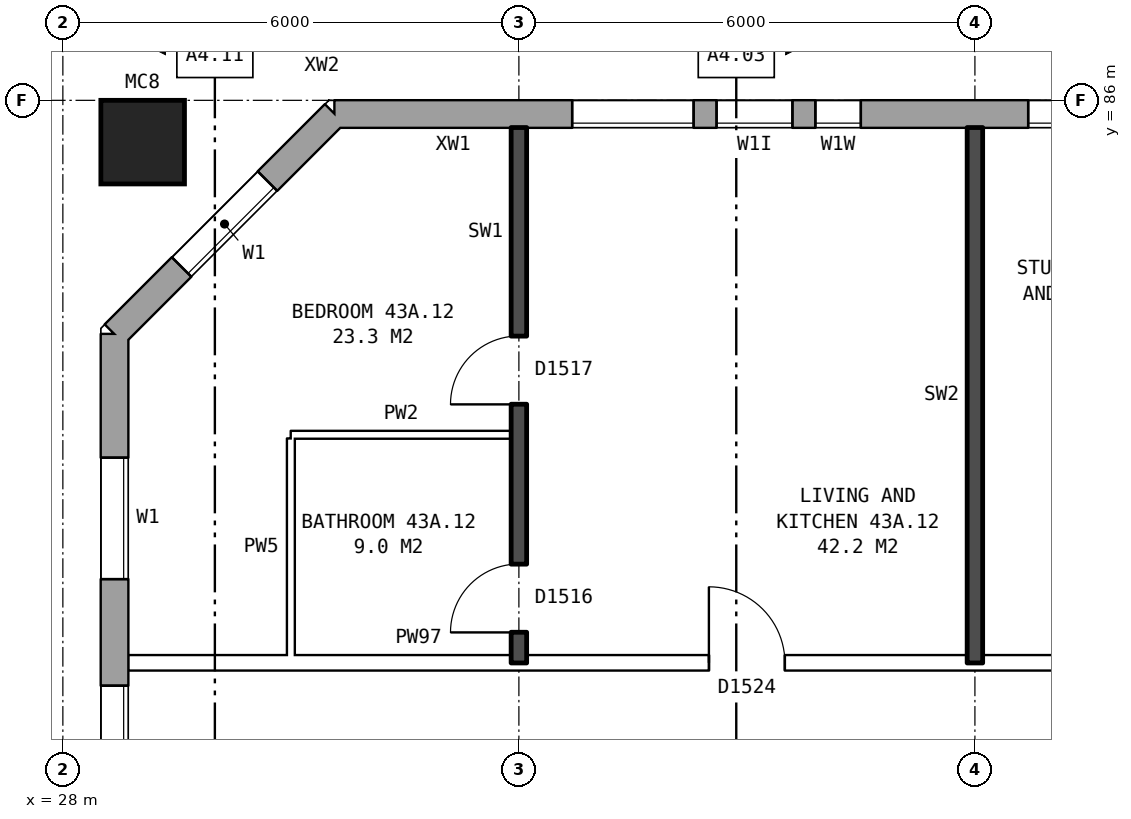
"""IFC4 building model, lengths in metres.
Left out: names, types, materials, properties, quantities, classifications, styles, units other than length and angle.
Written with IfcOpenShell. Run it as: python <this file> out.ifc"""

import sys

from ifc_helpers import new_model, si_unit, direction, frame, frame_2d, origin, origin_2d, place, context, subcontext, project, spatial, rectangle, hollow_rectangle, extrude, element, fill, save


model = new_model("IFC4")
c1 = context("Model", 3, precision=1e-05, world=origin(), true_north=direction((0.0, 1.0)))
c2 = subcontext(c1, "Body", "Model", "MODEL_VIEW")
j1 = project(units=[si_unit("LENGTHUNIT", "METRE"), si_unit("PLANEANGLEUNIT", "RADIAN")], contexts=[c1])
p1 = place(None, origin())
s1 = spatial("IfcSite", under=j1, at=p1, CompositionType="ELEMENT")
p2 = place(p1, origin())
s2 = spatial("IfcBuilding", under=s1, at=p2, CompositionType="ELEMENT")
p3 = place(p2, frame((0.0, 0.0, 154.7)))
s3 = spatial("IfcBuildingStorey", under=s2, at=p3, CompositionType="ELEMENT", Elevation=154.7)
p4 = place(p3, frame((29.05, 85.45, 0.0), z_axis=(0.0, 0.0, 1.0), x_axis=(1.0, 0.0, 0.0)))
e1 = element("IfcColumn", 1, at=p4, inside=s3, PredefinedType="COLUMN", context=c2, shape_type="SweptSolid", body=[
    extrude(hollow_rectangle(XDim=1.1, YDim=1.1, WallThickness=0.06, at=origin_2d()), origin(), (0.0, 0.0, 1.0), 3.1),
])
p5 = place(p3, frame((72.925, 85.82, 0.0), z_axis=(0.0, 0.0, 1.0), x_axis=(-1.0, 0.0, 0.0)))
e2 = element("IfcWall", 2, at=p5, inside=s3, PredefinedType="STANDARD", context=c2, shape_type="SweptSolid", body=[
    extrude(rectangle(XDim=41.351, YDim=0.36, at=frame_2d((20.675, 0.0))), origin(), (0.0, 0.0, 1.0), 2.85),
])
p6 = place(p5, frame((0.625, 0.0, 0.8)))
e3 = element("IfcOpeningElement", 3, at=p6, cuts=e2, PredefinedType="OPENING", context=c2, shape_type="SweptSolid", body=[
    extrude(rectangle(XDim=1.6, YDim=1.8, at=frame_2d((0.8, 0.9))), frame((0.0, 0.19, 0.0), z_axis=(0.0, -1.0, 0.0), x_axis=(1.0, 0.0, 0.0)), (0.0, 0.0, 1.0), 0.38),
])
p7 = place(p5, frame((3.625, 0.0, 0.8)))
e4 = element("IfcOpeningElement", 4, at=p7, cuts=e2, PredefinedType="OPENING", context=c2, shape_type="SweptSolid", body=[
    extrude(rectangle(XDim=1.6, YDim=1.8, at=frame_2d((0.8, 0.9))), frame((0.0, 0.19, 0.0), z_axis=(0.0, -1.0, 0.0), x_axis=(1.0, 0.0, 0.0)), (0.0, 0.0, 1.0), 0.38),
])
p8 = place(p5, frame((5.525, 0.0, 1.7)))
e5 = element("IfcOpeningElement", 5, at=p8, cuts=e2, PredefinedType="OPENING", context=c2, shape_type="SweptSolid", body=[
    extrude(rectangle(XDim=1.4, YDim=0.9, at=frame_2d((0.7, 0.45))), frame((0.0, 0.19, 0.0), z_axis=(0.0, -1.0, 0.0), x_axis=(1.0, 0.0, 0.0)), (0.0, 0.0, 1.0), 0.38),
])
p9 = place(p5, frame((9.625, 0.0, 0.8)))
e6 = element("IfcOpeningElement", 6, at=p9, cuts=e2, PredefinedType="OPENING", context=c2, shape_type="SweptSolid", body=[
    extrude(rectangle(XDim=1.6, YDim=1.8, at=frame_2d((0.8, 0.9))), frame((0.0, 0.19, 0.0), z_axis=(0.0, -1.0, 0.0), x_axis=(1.0, 0.0, 0.0)), (0.0, 0.0, 1.0), 0.38),
])
p10 = place(p5, frame((12.625, 0.0, 0.8)))
e7 = element("IfcOpeningElement", 7, at=p10, cuts=e2, PredefinedType="OPENING", context=c2, shape_type="SweptSolid", body=[
    extrude(rectangle(XDim=1.6, YDim=1.8, at=frame_2d((0.8, 0.9))), frame((0.0, 0.19, 0.0), z_axis=(0.0, -1.0, 0.0), x_axis=(1.0, 0.0, 0.0)), (0.0, 0.0, 1.0), 0.38),
])
p11 = place(p5, frame((15.625, 0.0, 0.8)))
e8 = element("IfcOpeningElement", 8, at=p11, cuts=e2, PredefinedType="OPENING", context=c2, shape_type="SweptSolid", body=[
    extrude(rectangle(XDim=1.6, YDim=1.8, at=frame_2d((0.8, 0.9))), frame((0.0, 0.19, 0.0), z_axis=(0.0, -1.0, 0.0), x_axis=(1.0, 0.0, 0.0)), (0.0, 0.0, 1.0), 0.38),
])
p12 = place(p5, frame((18.625, 0.0, 0.8)))
e9 = element("IfcOpeningElement", 9, at=p12, cuts=e2, PredefinedType="OPENING", context=c2, shape_type="SweptSolid", body=[
    extrude(rectangle(XDim=1.6, YDim=1.8, at=frame_2d((0.8, 0.9))), frame((0.0, 0.19, 0.0), z_axis=(0.0, -1.0, 0.0), x_axis=(1.0, 0.0, 0.0)), (0.0, 0.0, 1.0), 0.38),
])
p13 = place(p5, frame((21.625, 0.0, 0.8)))
e10 = element("IfcOpeningElement", 10, at=p13, cuts=e2, PredefinedType="OPENING", context=c2, shape_type="SweptSolid", body=[
    extrude(rectangle(XDim=1.6, YDim=1.8, at=frame_2d((0.8, 0.9))), frame((0.0, 0.19, 0.0), z_axis=(0.0, -1.0, 0.0), x_axis=(1.0, 0.0, 0.0)), (0.0, 0.0, 1.0), 0.38),
])
p14 = place(p5, frame((24.625, 0.0, 0.8)))
e11 = element("IfcOpeningElement", 11, at=p14, cuts=e2, PredefinedType="OPENING", context=c2, shape_type="SweptSolid", body=[
    extrude(rectangle(XDim=1.6, YDim=1.8, at=frame_2d((0.8, 0.9))), frame((0.0, 0.19, 0.0), z_axis=(0.0, -1.0, 0.0), x_axis=(1.0, 0.0, 0.0)), (0.0, 0.0, 1.0), 0.38),
])
p15 = place(p5, frame((27.625, 0.0, 0.8)))
e12 = element("IfcOpeningElement", 12, at=p15, cuts=e2, PredefinedType="OPENING", context=c2, shape_type="SweptSolid", body=[
    extrude(rectangle(XDim=1.6, YDim=1.8, at=frame_2d((0.8, 0.9))), frame((0.0, 0.19, 0.0), z_axis=(0.0, -1.0, 0.0), x_axis=(1.0, 0.0, 0.0)), (0.0, 0.0, 1.0), 0.38),
])
p16 = place(p5, frame((30.625, 0.0, 0.8)))
e13 = element("IfcOpeningElement", 13, at=p16, cuts=e2, PredefinedType="OPENING", context=c2, shape_type="SweptSolid", body=[
    extrude(rectangle(XDim=1.6, YDim=1.8, at=frame_2d((0.8, 0.9))), frame((0.0, 0.19, 0.0), z_axis=(0.0, -1.0, 0.0), x_axis=(1.0, 0.0, 0.0)), (0.0, 0.0, 1.0), 0.38),
])
p17 = place(p5, frame((34.425, 0.0, 1.7)))
e14 = element("IfcOpeningElement", 14, at=p17, cuts=e2, PredefinedType="OPENING", context=c2, shape_type="SweptSolid", body=[
    extrude(rectangle(XDim=0.6, YDim=0.9, at=frame_2d((0.3, 0.45))), frame((0.0, 0.19, 0.0), z_axis=(0.0, -1.0, 0.0), x_axis=(1.0, 0.0, 0.0)), (0.0, 0.0, 1.0), 0.38),
])
p18 = place(p5, frame((36.625, 0.0, 0.8)))
e15 = element("IfcOpeningElement", 15, at=p18, cuts=e2, PredefinedType="OPENING", context=c2, shape_type="SweptSolid", body=[
    extrude(rectangle(XDim=1.6, YDim=1.8, at=frame_2d((0.8, 0.9))), frame((0.0, 0.19, 0.0), z_axis=(0.0, -1.0, 0.0), x_axis=(1.0, 0.0, 0.0)), (0.0, 0.0, 1.0), 0.38),
])
p19 = place(p5, frame((35.325, 0.0, 1.0)))
e16 = element("IfcOpeningElement", 16, at=p19, cuts=e2, PredefinedType="OPENING", context=c2, shape_type="SweptSolid", body=[
    extrude(rectangle(XDim=1.0, YDim=1.5, at=frame_2d((0.5, 0.75))), frame((0.0, 0.19, 0.0), z_axis=(0.0, -1.0, 0.0), x_axis=(1.0, 0.0, 0.0)), (0.0, 0.0, 1.0), 0.38),
])
p20 = place(p3, frame((31.575, 85.82, 0.0), z_axis=(0.0, 0.0, 1.0), x_axis=(-0.707106781187, -0.707106781187, 0.0)))
e17 = element("IfcWall", 17, at=p20, inside=s3, PredefinedType="STANDARD", context=c2, shape_type="SweptSolid", body=[
    extrude(rectangle(XDim=4.094, YDim=0.36, at=frame_2d((2.047, 0.0))), origin(), (0.0, 0.0, 1.0), 2.85),
])
p21 = place(p20, frame((1.247, 0.0, 0.8)))
e18 = element("IfcOpeningElement", 18, at=p21, cuts=e17, PredefinedType="OPENING", context=c2, shape_type="SweptSolid", body=[
    extrude(rectangle(XDim=1.6, YDim=1.8, at=frame_2d((0.8, 0.9))), frame((0.0, 0.19, 0.0), z_axis=(0.0, -1.0, 0.0), x_axis=(1.0, 0.0, 0.0)), (0.0, 0.0, 1.0), 0.38),
])
p22 = place(p3, frame((28.68, 82.925, 0.0), z_axis=(0.0, 0.0, 1.0), x_axis=(0.0, -1.0, 0.0)))
e19 = element("IfcWall", 19, at=p22, inside=s3, PredefinedType="STANDARD", context=c2, shape_type="SweptSolid", body=[
    extrude(rectangle(XDim=25.851, YDim=0.36, at=frame_2d((12.925, 0.0))), origin(), (0.0, 0.0, 1.0), 2.85),
])
p23 = place(p22, frame((1.625, 0.0, 0.8)))
e20 = element("IfcOpeningElement", 20, at=p23, cuts=e19, PredefinedType="OPENING", context=c2, shape_type="SweptSolid", body=[
    extrude(rectangle(XDim=1.6, YDim=1.8, at=frame_2d((0.8, 0.9))), frame((0.0, 0.19, 0.0), z_axis=(0.0, -1.0, 0.0), x_axis=(1.0, 0.0, 0.0)), (0.0, 0.0, 1.0), 0.38),
])
p24 = place(p22, frame((4.625, 0.0, 0.8)))
e21 = element("IfcOpeningElement", 21, at=p24, cuts=e19, PredefinedType="OPENING", context=c2, shape_type="SweptSolid", body=[
    extrude(rectangle(XDim=1.6, YDim=1.8, at=frame_2d((0.8, 0.9))), frame((0.0, 0.19, 0.0), z_axis=(0.0, -1.0, 0.0), x_axis=(1.0, 0.0, 0.0)), (0.0, 0.0, 1.0), 0.38),
])
p25 = place(p22, frame((7.625, 0.0, 0.8)))
e22 = element("IfcOpeningElement", 22, at=p25, cuts=e19, PredefinedType="OPENING", context=c2, shape_type="SweptSolid", body=[
    extrude(rectangle(XDim=1.6, YDim=1.8, at=frame_2d((0.8, 0.9))), frame((0.0, 0.19, 0.0), z_axis=(0.0, -1.0, 0.0), x_axis=(1.0, 0.0, 0.0)), (0.0, 0.0, 1.0), 0.38),
])
p26 = place(p22, frame((6.525, 0.0, 0.8)))
e23 = element("IfcOpeningElement", 23, at=p26, cuts=e19, PredefinedType="OPENING", context=c2, shape_type="SweptSolid", body=[
    extrude(rectangle(XDim=0.8, YDim=1.8, at=frame_2d((0.4, 0.9))), frame((0.0, 0.19, 0.0), z_axis=(0.0, -1.0, 0.0), x_axis=(1.0, 0.0, 0.0)), (0.0, 0.0, 1.0), 0.38),
])
p27 = place(p22, frame((9.525, 0.0, 1.7)))
e24 = element("IfcOpeningElement", 24, at=p27, cuts=e19, PredefinedType="OPENING", context=c2, shape_type="SweptSolid", body=[
    extrude(rectangle(XDim=0.8, YDim=0.9, at=frame_2d((0.4, 0.45))), frame((0.0, 0.19, 0.0), z_axis=(0.0, -1.0, 0.0), x_axis=(1.0, 0.0, 0.0)), (0.0, 0.0, 1.0), 0.38),
])
p28 = place(p22, frame((16.625, 0.0, 0.8)))
e25 = element("IfcOpeningElement", 25, at=p28, cuts=e19, PredefinedType="OPENING", context=c2, shape_type="SweptSolid", body=[
    extrude(rectangle(XDim=1.6, YDim=1.8, at=frame_2d((0.8, 0.9))), frame((0.0, 0.19, 0.0), z_axis=(0.0, -1.0, 0.0), x_axis=(1.0, 0.0, 0.0)), (0.0, 0.0, 1.0), 0.38),
])
p29 = place(p22, frame((19.625, 0.0, 0.8)))
e26 = element("IfcOpeningElement", 26, at=p29, cuts=e19, PredefinedType="OPENING", context=c2, shape_type="SweptSolid", body=[
    extrude(rectangle(XDim=1.6, YDim=1.8, at=frame_2d((0.8, 0.9))), frame((0.0, 0.19, 0.0), z_axis=(0.0, -1.0, 0.0), x_axis=(1.0, 0.0, 0.0)), (0.0, 0.0, 1.0), 0.38),
])
p30 = place(p22, frame((22.625, 0.0, 0.8)))
e27 = element("IfcOpeningElement", 27, at=p30, cuts=e19, PredefinedType="OPENING", context=c2, shape_type="SweptSolid", body=[
    extrude(rectangle(XDim=1.6, YDim=1.8, at=frame_2d((0.8, 0.9))), frame((0.0, 0.19, 0.0), z_axis=(0.0, -1.0, 0.0), x_axis=(1.0, 0.0, 0.0)), (0.0, 0.0, 1.0), 0.38),
])
p31 = place(p22, frame((11.425, 0.0, 0.8)))
e28 = element("IfcOpeningElement", 28, at=p31, cuts=e19, PredefinedType="OPENING", context=c2, shape_type="SweptSolid", body=[
    extrude(rectangle(XDim=0.6, YDim=0.9, at=frame_2d((0.3, 0.45))), frame((0.0, 0.19, 0.0), z_axis=(0.0, -1.0, 0.0), x_axis=(1.0, 0.0, 0.0)), (0.0, 0.0, 1.0), 0.38),
])
p32 = place(p22, frame((12.325, 0.0, 0.8)))
e29 = element("IfcOpeningElement", 29, at=p32, cuts=e19, PredefinedType="OPENING", context=c2, shape_type="SweptSolid", body=[
    extrude(rectangle(XDim=1.2, YDim=1.8, at=frame_2d((0.6, 0.9))), frame((0.0, 0.19, 0.0), z_axis=(0.0, -1.0, 0.0), x_axis=(1.0, 0.0, 0.0)), (0.0, 0.0, 1.0), 0.38),
])
p33 = place(p22, frame((13.825, 0.0, 0.8)))
e30 = element("IfcOpeningElement", 30, at=p33, cuts=e19, PredefinedType="OPENING", context=c2, shape_type="SweptSolid", body=[
    extrude(rectangle(XDim=0.6, YDim=0.9, at=frame_2d((0.3, 0.45))), frame((0.0, 0.19, 0.0), z_axis=(0.0, -1.0, 0.0), x_axis=(1.0, 0.0, 0.0)), (0.0, 0.0, 1.0), 0.38),
])
p34 = place(p22, frame((15.475, 0.0, 1.7)))
e31 = element("IfcOpeningElement", 31, at=p34, cuts=e19, PredefinedType="OPENING", context=c2, shape_type="SweptSolid", body=[
    extrude(rectangle(XDim=0.6, YDim=0.9, at=frame_2d((0.3, 0.45))), frame((0.0, 0.19, 0.0), z_axis=(0.0, -1.0, 0.0), x_axis=(1.0, 0.0, 0.0)), (0.0, 0.0, 1.0), 0.38),
])
p35 = place(p22, frame((18.525, 0.0, 0.8)))
e32 = element("IfcOpeningElement", 32, at=p35, cuts=e19, PredefinedType="OPENING", context=c2, shape_type="SweptSolid", body=[
    extrude(rectangle(XDim=0.8, YDim=1.8, at=frame_2d((0.4, 0.9))), frame((0.0, 0.19, 0.0), z_axis=(0.0, -1.0, 0.0), x_axis=(1.0, 0.0, 0.0)), (0.0, 0.0, 1.0), 0.38),
])
p36 = place(p3, frame((28.86, 78.6, 0.0), z_axis=(0.0, 0.0, 1.0), x_axis=(1.0, 0.0, 0.0)))
e33 = element("IfcWall", 33, at=p36, inside=s3, PredefinedType="PARTITIONING", context=c2, shape_type="SweptSolid", body=[
    extrude(rectangle(XDim=17.04, YDim=0.2, at=frame_2d((8.52, 0.0))), origin(), (0.0, 0.0, 1.0), 2.85),
])
p37 = place(p36, frame((12.44, 0.0, 0.0)))
e34 = element("IfcOpeningElement", 34, at=p37, cuts=e33, PredefinedType="OPENING", context=c2, shape_type="SweptSolid", body=[
    extrude(rectangle(XDim=1.0, YDim=2.1, at=frame_2d((0.5, 1.05))), frame((0.0, 0.11, 0.0), z_axis=(0.0, -1.0, 0.0), x_axis=(1.0, 0.0, 0.0)), (0.0, 0.0, 1.0), 0.22),
])
p38 = place(p36, frame((7.64, 0.0, 0.0)))
e35 = element("IfcOpeningElement", 35, at=p38, cuts=e33, PredefinedType="OPENING", context=c2, shape_type="SweptSolid", body=[
    extrude(rectangle(XDim=1.0, YDim=2.1, at=frame_2d((0.5, 1.05))), frame((0.0, 0.11, 0.0), z_axis=(0.0, -1.0, 0.0), x_axis=(1.0, 0.0, 0.0)), (0.0, 0.0, 1.0), 0.22),
])
p39 = place(p3, frame((31.0, 81.6, 0.0), z_axis=(0.0, 0.0, 1.0), x_axis=(1.0, 0.0, 0.0)))
e36 = element("IfcWall", 36, at=p39, inside=s3, PredefinedType="PARTITIONING", context=c2, shape_type="SweptSolid", body=[
    extrude(rectangle(XDim=2.9, YDim=0.1, at=frame_2d((1.45, 0.0))), origin(), (0.0, 0.0, 1.0), 2.85),
])
p40 = place(p3, frame((31.0, 78.7, 0.0), z_axis=(0.0, 0.0, 1.0), x_axis=(0.0, 1.0, 0.0)))
e37 = element("IfcWall", 37, at=p40, inside=s3, PredefinedType="PARTITIONING", context=c2, shape_type="SweptSolid", body=[
    extrude(rectangle(XDim=2.85, YDim=0.1, at=frame_2d((1.425, 0.0))), origin(), (0.0, 0.0, 1.0), 2.85),
])
p41 = place(p3, frame((34.0, 78.6, 0.0), z_axis=(0.0, 0.0, 1.0), x_axis=(0.0, 1.0, 0.0)))
e38 = element("IfcWall", 38, at=p41, inside=s3, PredefinedType="SOLIDWALL", context=c2, shape_type="SweptSolid", body=[
    extrude(rectangle(XDim=7.04, YDim=0.2, at=frame_2d((3.52, 0.0))), origin(), (0.0, 0.0, 1.0), 2.85),
])
p42 = place(p41, frame((3.4, 0.0, 0.0)))
e39 = element("IfcOpeningElement", 39, at=p42, cuts=e38, PredefinedType="OPENING", context=c2, shape_type="SweptSolid", body=[
    extrude(rectangle(XDim=0.9, YDim=2.1, at=frame_2d((0.45, 1.05))), frame((0.0, 0.11, 0.0), z_axis=(0.0, -1.0, 0.0), x_axis=(1.0, 0.0, 0.0)), (0.0, 0.0, 1.0), 0.22),
])
p43 = place(p41, frame((0.4, 0.0, 0.0)))
e40 = element("IfcOpeningElement", 40, at=p43, cuts=e38, PredefinedType="OPENING", context=c2, shape_type="SweptSolid", body=[
    extrude(rectangle(XDim=0.9, YDim=2.1, at=frame_2d((0.45, 1.05))), frame((0.0, 0.11, 0.0), z_axis=(0.0, -1.0, 0.0), x_axis=(1.0, 0.0, 0.0)), (0.0, 0.0, 1.0), 0.22),
])
p44 = place(p3, frame((40.0, 78.6, 0.0), z_axis=(0.0, 0.0, 1.0), x_axis=(0.0, 1.0, 0.0)))
e41 = element("IfcWall", 41, at=p44, inside=s3, PredefinedType="SOLIDWALL", context=c2, shape_type="SweptSolid", body=[
    extrude(rectangle(XDim=7.04, YDim=0.2, at=frame_2d((3.52, 0.0))), origin(), (0.0, 0.0, 1.0), 2.85),
])
p45 = place(p16, origin())
e42 = element("IfcWindow", 42, at=p45, inside=s3, PartitioningType="SINGLE_PANEL", PredefinedType="WINDOW", context=c2, shape_type="SweptSolid", body=[
    extrude(rectangle(XDim=1.6, YDim=1.8, at=frame_2d((0.8, 0.9))), frame((0.0, 0.15, 0.0), z_axis=(0.0, -1.0, 0.0), x_axis=(1.0, 0.0, 0.0)), (0.0, 0.0, 1.0), 0.06),
])
fill(e13, e42)
p46 = place(p17, origin())
e43 = element("IfcWindow", 43, at=p46, inside=s3, PartitioningType="SINGLE_PANEL", PredefinedType="WINDOW", context=c2, shape_type="SweptSolid", body=[
    extrude(rectangle(XDim=0.6, YDim=0.9, at=frame_2d((0.3, 0.45))), frame((0.0, 0.15, 0.0), z_axis=(0.0, -1.0, 0.0), x_axis=(1.0, 0.0, 0.0)), (0.0, 0.0, 1.0), 0.06),
])
fill(e14, e43)
p47 = place(p18, origin())
e44 = element("IfcWindow", 44, at=p47, inside=s3, PartitioningType="SINGLE_PANEL", PredefinedType="WINDOW", context=c2, shape_type="SweptSolid", body=[
    extrude(rectangle(XDim=1.6, YDim=1.8, at=frame_2d((0.8, 0.9))), frame((0.0, 0.15, 0.0), z_axis=(0.0, -1.0, 0.0), x_axis=(1.0, 0.0, 0.0)), (0.0, 0.0, 1.0), 0.06),
])
fill(e15, e44)
p48 = place(p21, origin())
e45 = element("IfcWindow", 45, at=p48, inside=s3, PartitioningType="SINGLE_PANEL", PredefinedType="WINDOW", context=c2, shape_type="SweptSolid", body=[
    extrude(rectangle(XDim=1.6, YDim=1.8, at=frame_2d((0.8, 0.9))), frame((0.0, 0.15, 0.0), z_axis=(0.0, -1.0, 0.0), x_axis=(1.0, 0.0, 0.0)), (0.0, 0.0, 1.0), 0.06),
])
fill(e18, e45)
p49 = place(p23, origin())
e46 = element("IfcWindow", 46, at=p49, inside=s3, PartitioningType="SINGLE_PANEL", PredefinedType="WINDOW", context=c2, shape_type="SweptSolid", body=[
    extrude(rectangle(XDim=1.6, YDim=1.8, at=frame_2d((0.8, 0.9))), frame((0.0, 0.15, 0.0), z_axis=(0.0, -1.0, 0.0), x_axis=(1.0, 0.0, 0.0)), (0.0, 0.0, 1.0), 0.06),
])
fill(e20, e46)
p50 = place(p24, origin())
e47 = element("IfcWindow", 47, at=p50, inside=s3, PartitioningType="SINGLE_PANEL", PredefinedType="WINDOW", context=c2, shape_type="SweptSolid", body=[
    extrude(rectangle(XDim=1.6, YDim=1.8, at=frame_2d((0.8, 0.9))), frame((0.0, 0.15, 0.0), z_axis=(0.0, -1.0, 0.0), x_axis=(1.0, 0.0, 0.0)), (0.0, 0.0, 1.0), 0.06),
])
fill(e21, e47)
p51 = place(p42, origin())
e48 = element("IfcDoor", 48, at=p51, inside=s3, OperationType="SINGLE_SWING_LEFT", PredefinedType="DOOR", context=c2, shape_type="SweptSolid", body=[
    extrude(rectangle(XDim=0.9, YDim=2.1, at=frame_2d((0.45, 1.05))), frame((0.0, 0.025, 0.0), z_axis=(0.0, -1.0, 0.0), x_axis=(1.0, 0.0, 0.0)), (0.0, 0.0, 1.0), 0.05),
])
fill(e39, e48)
p52 = place(p38, origin())
e49 = element("IfcDoor", 49, at=p52, inside=s3, OperationType="SINGLE_SWING_LEFT", PredefinedType="DOOR", context=c2, shape_type="SweptSolid", body=[
    extrude(rectangle(XDim=1.0, YDim=2.1, at=frame_2d((0.5, 1.05))), frame((0.0, 0.025, 0.0), z_axis=(0.0, -1.0, 0.0), x_axis=(1.0, 0.0, 0.0)), (0.0, 0.0, 1.0), 0.05),
])
fill(e35, e49)
p53 = place(p43, origin())
e50 = element("IfcDoor", 50, at=p53, inside=s3, OperationType="SINGLE_SWING_LEFT", PredefinedType="DOOR", context=c2, shape_type="SweptSolid", body=[
    extrude(rectangle(XDim=0.9, YDim=2.1, at=frame_2d((0.45, 1.05))), frame((0.0, 0.025, 0.0), z_axis=(0.0, -1.0, 0.0), x_axis=(1.0, 0.0, 0.0)), (0.0, 0.0, 1.0), 0.05),
])
fill(e40, e50)
p54 = place(p19, origin())
e51 = element("IfcWindow", 51, at=p54, inside=s3, PartitioningType="SINGLE_PANEL", PredefinedType="WINDOW", context=c2, shape_type="SweptSolid", body=[
    extrude(rectangle(XDim=1.0, YDim=1.5, at=frame_2d((0.5, 0.75))), frame((0.0, 0.15, 0.0), z_axis=(0.0, -1.0, 0.0), x_axis=(1.0, 0.0, 0.0)), (0.0, 0.0, 1.0), 0.06),
])
fill(e16, e51)
save(model, sys.argv[1])
